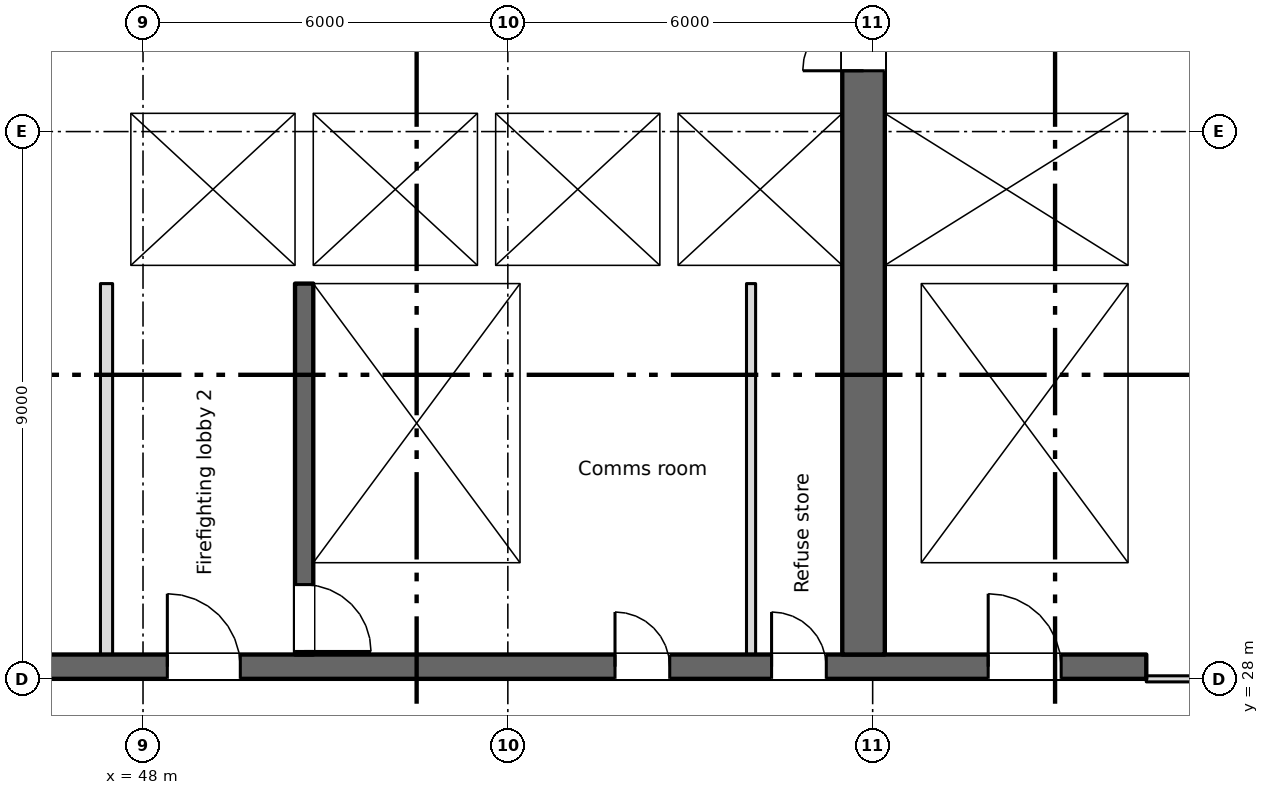
"""IFC4 building model, lengths in metres.
Left out: names, types, materials, properties, quantities, classifications, styles, units other than length and angle.
Written with IfcOpenShell. Run it as: python <this file> out.ifc"""

import sys

from ifc_helpers import new_model, si_unit, direction, frame, frame_2d, origin, place, context, subcontext, project, spatial, rectangle, extrude, element, fill, save


model = new_model("IFC4")
c1 = context("Model", 3, precision=1e-05, world=origin(), true_north=direction((0.0, 1.0)))
c2 = subcontext(c1, "Body", "Model", "MODEL_VIEW")
j1 = project(units=[si_unit("LENGTHUNIT", "METRE"), si_unit("PLANEANGLEUNIT", "RADIAN")], contexts=[c1])
p1 = place(None, origin())
s1 = spatial("IfcSite", under=j1, at=p1, CompositionType="ELEMENT")
p2 = place(p1, origin())
s2 = spatial("IfcBuilding", under=s1, at=p2, CompositionType="ELEMENT")
p3 = place(p2, frame((0.0, 0.0, 215.5)))
s3 = spatial("IfcBuildingStorey", under=s2, at=p3, CompositionType="ELEMENT", Elevation=215.5)
p4 = place(p3, frame((6.6, 28.2, 0.0), z_axis=(0.0, 0.0, 1.0), x_axis=(1.0, 0.0, 0.0)))
e1 = element("IfcWall", 1, at=p4, inside=s3, PredefinedType="SHEAR", context=c2, shape_type="SweptSolid", body=[
    extrude(rectangle(XDim=57.9, YDim=0.4, at=frame_2d((28.95, 0.0))), origin(), (0.0, 0.0, 1.0), 3.35),
])
p5 = place(p4, frame((12.163, 0.0, 0.0)))
e2 = element("IfcOpeningElement", 2, at=p5, cuts=e1, PredefinedType="OPENING", context=c2, shape_type="SweptSolid", body=[
    extrude(rectangle(XDim=0.9, YDim=2.1, at=frame_2d((0.45, 1.05))), frame((0.0, 0.21, 0.0), z_axis=(0.0, -1.0, 0.0), x_axis=(1.0, 0.0, 0.0)), (0.0, 0.0, 1.0), 0.42),
])
p6 = place(p4, frame((14.738, 0.0, 0.0)))
e3 = element("IfcOpeningElement", 3, at=p6, cuts=e1, PredefinedType="OPENING", context=c2, shape_type="SweptSolid", body=[
    extrude(rectangle(XDim=0.9, YDim=2.1, at=frame_2d((0.45, 1.05))), frame((0.0, 0.21, 0.0), z_axis=(0.0, -1.0, 0.0), x_axis=(1.0, 0.0, 0.0)), (0.0, 0.0, 1.0), 0.42),
])
p7 = place(p4, frame((49.163, 0.0, 0.0)))
e4 = element("IfcOpeningElement", 4, at=p7, cuts=e1, PredefinedType="OPENING", context=c2, shape_type="SweptSolid", body=[
    extrude(rectangle(XDim=0.9, YDim=2.1, at=frame_2d((0.45, 1.05))), frame((0.0, 0.21, 0.0), z_axis=(0.0, -1.0, 0.0), x_axis=(1.0, 0.0, 0.0)), (0.0, 0.0, 1.0), 0.42),
])
p8 = place(p4, frame((51.738, 0.0, 0.0)))
e5 = element("IfcOpeningElement", 5, at=p8, cuts=e1, PredefinedType="OPENING", context=c2, shape_type="SweptSolid", body=[
    extrude(rectangle(XDim=0.9, YDim=2.1, at=frame_2d((0.45, 1.05))), frame((0.0, 0.21, 0.0), z_axis=(0.0, -1.0, 0.0), x_axis=(1.0, 0.0, 0.0)), (0.0, 0.0, 1.0), 0.42),
])
p9 = place(p4, frame((1.45, 0.0, 0.0)))
e6 = element("IfcOpeningElement", 6, at=p9, cuts=e1, PredefinedType="OPENING", context=c2, shape_type="SweptSolid", body=[
    extrude(rectangle(XDim=0.9, YDim=2.1, at=frame_2d((0.45, 1.05))), frame((0.0, 0.21, 0.0), z_axis=(0.0, -1.0, 0.0), x_axis=(1.0, 0.0, 0.0)), (0.0, 0.0, 1.0), 0.42),
])
p10 = place(p4, frame((4.8, 0.0, 0.0)))
e7 = element("IfcOpeningElement", 7, at=p10, cuts=e1, PredefinedType="OPENING", context=c2, shape_type="SweptSolid", body=[
    extrude(rectangle(XDim=1.2, YDim=2.1, at=frame_2d((0.6, 1.05))), frame((0.0, 0.21, 0.0), z_axis=(0.0, -1.0, 0.0), x_axis=(1.0, 0.0, 0.0)), (0.0, 0.0, 1.0), 0.42),
])
p11 = place(p4, frame((31.8, 0.0, 0.0)))
e8 = element("IfcOpeningElement", 8, at=p11, cuts=e1, PredefinedType="OPENING", context=c2, shape_type="SweptSolid", body=[
    extrude(rectangle(XDim=1.2, YDim=2.1, at=frame_2d((0.6, 1.05))), frame((0.0, 0.21, 0.0), z_axis=(0.0, -1.0, 0.0), x_axis=(1.0, 0.0, 0.0)), (0.0, 0.0, 1.0), 0.42),
])
p12 = place(p4, frame((55.3, 0.0, 0.0)))
e9 = element("IfcOpeningElement", 9, at=p12, cuts=e1, PredefinedType="OPENING", context=c2, shape_type="SweptSolid", body=[
    extrude(rectangle(XDim=1.2, YDim=2.1, at=frame_2d((0.6, 1.05))), frame((0.0, 0.21, 0.0), z_axis=(0.0, -1.0, 0.0), x_axis=(1.0, 0.0, 0.0)), (0.0, 0.0, 1.0), 0.42),
])
p13 = place(p4, frame((21.8, 0.0, 0.0)))
e10 = element("IfcOpeningElement", 10, at=p13, cuts=e1, PredefinedType="OPENING", context=c2, shape_type="SweptSolid", body=[
    extrude(rectangle(XDim=1.2, YDim=2.1, at=frame_2d((0.6, 1.05))), frame((0.0, 0.21, 0.0), z_axis=(0.0, -1.0, 0.0), x_axis=(1.0, 0.0, 0.0)), (0.0, 0.0, 1.0), 0.42),
])
p14 = place(p4, frame((41.8, 0.0, 0.0)))
e11 = element("IfcOpeningElement", 11, at=p14, cuts=e1, PredefinedType="OPENING", context=c2, shape_type="SweptSolid", body=[
    extrude(rectangle(XDim=1.2, YDim=2.1, at=frame_2d((0.6, 1.05))), frame((0.0, 0.21, 0.0), z_axis=(0.0, -1.0, 0.0), x_axis=(1.0, 0.0, 0.0)), (0.0, 0.0, 1.0), 0.42),
])
p15 = place(p4, frame((24.95, 0.0, 0.0)))
e12 = element("IfcOpeningElement", 12, at=p15, cuts=e1, PredefinedType="OPENING", context=c2, shape_type="SweptSolid", body=[
    extrude(rectangle(XDim=2.4, YDim=2.1, at=frame_2d((1.2, 1.05))), frame((0.0, 0.21, 0.0), z_axis=(0.0, -1.0, 0.0), x_axis=(1.0, 0.0, 0.0)), (0.0, 0.0, 1.0), 0.42),
])
p16 = place(p4, frame((37.45, 0.0, 0.0)))
e13 = element("IfcOpeningElement", 13, at=p16, cuts=e1, PredefinedType="OPENING", context=c2, shape_type="SweptSolid", body=[
    extrude(rectangle(XDim=2.4, YDim=2.1, at=frame_2d((1.2, 1.05))), frame((0.0, 0.21, 0.0), z_axis=(0.0, -1.0, 0.0), x_axis=(1.0, 0.0, 0.0)), (0.0, 0.0, 1.0), 0.42),
])
p17 = place(p4, frame((8.1, 0.0, 0.0)))
e14 = element("IfcOpeningElement", 14, at=p17, cuts=e1, PredefinedType="OPENING", context=c2, shape_type="SweptSolid", body=[
    extrude(rectangle(XDim=2.4, YDim=2.1, at=frame_2d((1.2, 1.05))), frame((0.0, 0.21, 0.0), z_axis=(0.0, -1.0, 0.0), x_axis=(1.0, 0.0, 0.0)), (0.0, 0.0, 1.0), 0.42),
])
p18 = place(p4, frame((28.95, 0.0, 0.0)))
e15 = element("IfcOpeningElement", 15, at=p18, cuts=e1, PredefinedType="OPENING", context=c2, shape_type="SweptSolid", body=[
    extrude(rectangle(XDim=0.9, YDim=2.1, at=frame_2d((0.45, 1.05))), frame((0.0, 0.21, 0.0), z_axis=(0.0, -1.0, 0.0), x_axis=(1.0, 0.0, 0.0)), (0.0, 0.0, 1.0), 0.42),
])
p19 = place(p4, frame((34.95, 0.0, 0.0)))
e16 = element("IfcOpeningElement", 16, at=p19, cuts=e1, PredefinedType="OPENING", context=c2, shape_type="SweptSolid", body=[
    extrude(rectangle(XDim=0.9, YDim=2.1, at=frame_2d((0.45, 1.05))), frame((0.0, 0.21, 0.0), z_axis=(0.0, -1.0, 0.0), x_axis=(1.0, 0.0, 0.0)), (0.0, 0.0, 1.0), 0.42),
])
p20 = place(p3, frame((64.35, 34.8, 0.0), z_axis=(0.0, 0.0, 1.0), x_axis=(0.0, 1.0, 0.0)))
e17 = element("IfcWall", 17, at=p20, inside=s3, PredefinedType="SHEAR", context=c2, shape_type="SweptSolid", body=[
    extrude(rectangle(XDim=10.5, YDim=0.3, at=frame_2d((5.25, 0.0))), origin(), (0.0, 0.0, 1.0), 3.35),
])
p21 = place(p3, frame((59.85, 28.4, 0.0), z_axis=(0.0, 0.0, 1.0), x_axis=(0.0, 1.0, 0.0)))
e18 = element("IfcWall", 18, at=p21, inside=s3, PredefinedType="SHEAR", context=c2, shape_type="SweptSolid", body=[
    extrude(rectangle(XDim=16.9, YDim=0.7, at=frame_2d((8.45, 0.0))), origin(), (0.0, 0.0, 1.0), 3.35),
])
p22 = place(p21, frame((9.6, 0.0, 0.0)))
e19 = element("IfcOpeningElement", 19, at=p22, cuts=e18, PredefinedType="OPENING", context=c2, shape_type="SweptSolid", body=[
    extrude(rectangle(XDim=2.0, YDim=2.1, at=frame_2d((1.0, 1.05))), frame((0.0, 0.36, 0.0), z_axis=(0.0, -1.0, 0.0), x_axis=(1.0, 0.0, 0.0)), (0.0, 0.0, 1.0), 0.72),
])
p23 = place(p21, frame((15.4, 0.0, 0.0)))
e20 = element("IfcOpeningElement", 20, at=p23, cuts=e18, PredefinedType="OPENING", context=c2, shape_type="SweptSolid", body=[
    extrude(rectangle(XDim=1.2, YDim=2.1, at=frame_2d((0.6, 1.05))), frame((0.0, 0.36, 0.0), z_axis=(0.0, -1.0, 0.0), x_axis=(1.0, 0.0, 0.0)), (0.0, 0.0, 1.0), 0.72),
])
p24 = place(p3, frame((50.65, 34.5, 0.0), z_axis=(0.0, 0.0, 1.0), x_axis=(0.0, -1.0, 0.0)))
e21 = element("IfcWall", 21, at=p24, inside=s3, PredefinedType="SHEAR", context=c2, shape_type="SweptSolid", body=[
    extrude(rectangle(XDim=6.1, YDim=0.3, at=frame_2d((3.05, 0.0))), origin(), (0.0, 0.0, 1.0), 3.35),
])
p25 = place(p24, frame((4.95, 0.0, 0.0)))
e22 = element("IfcOpeningElement", 22, at=p25, cuts=e21, PredefinedType="OPENING", context=c2, shape_type="SweptSolid", body=[
    extrude(rectangle(XDim=1.1, YDim=2.1, at=frame_2d((0.55, 1.05))), frame((0.0, 0.16, 0.0), z_axis=(0.0, -1.0, 0.0), x_axis=(1.0, 0.0, 0.0)), (0.0, 0.0, 1.0), 0.32),
])
p26 = place(p3, frame((54.35, 28.4, 0.0), z_axis=(0.0, 0.0, 1.0), x_axis=(0.0, 1.0, 0.0)))
e23 = element("IfcWall", 23, at=p26, inside=s3, PredefinedType="SHEAR", context=c2, shape_type="SweptSolid", body=[
    extrude(rectangle(XDim=6.1, YDim=0.3, at=frame_2d((3.05, 0.0))), origin(), (0.0, 0.0, 1.0), 3.35),
])
p27 = place(p3, frame((60.5, 28.4, 0.0), z_axis=(0.0, 0.0, 1.0), x_axis=(0.0, 1.0, 0.0)))
e24 = element("IfcWall", 24, at=p27, inside=s3, PredefinedType="SHEAR", context=c2, shape_type="SweptSolid", body=[
    extrude(rectangle(XDim=6.1, YDim=0.6, at=frame_2d((3.05, 0.0))), origin(), (0.0, 0.0, 1.0), 3.35),
])
p28 = place(p3, frame((64.35, 28.4, 0.0), z_axis=(0.0, 0.0, 1.0), x_axis=(0.0, 1.0, 0.0)))
e25 = element("IfcWall", 25, at=p28, inside=s3, PredefinedType="SHEAR", context=c2, shape_type="SweptSolid", body=[
    extrude(rectangle(XDim=6.1, YDim=0.3, at=frame_2d((3.05, 0.0))), origin(), (0.0, 0.0, 1.0), 3.35),
])
p29 = place(p3, frame((47.3, 34.65, 0.0), z_axis=(0.0, 0.0, 1.0), x_axis=(1.0, 0.0, 0.0)))
e26 = element("IfcWall", 26, at=p29, inside=s3, PredefinedType="SHEAR", context=c2, shape_type="SweptSolid", body=[
    extrude(rectangle(XDim=12.2, YDim=0.3, at=frame_2d((6.1, 0.0))), origin(), (0.0, 0.0, 1.0), 3.35),
])
p30 = place(p29, frame((1.3, 0.0, 0.0)))
e27 = element("IfcOpeningElement", 27, at=p30, cuts=e26, PredefinedType="OPENING", context=c2, shape_type="SweptSolid", body=[
    extrude(rectangle(XDim=1.1, YDim=2.1, at=frame_2d((0.55, 1.05))), frame((0.0, 0.16, 0.0), z_axis=(0.0, -1.0, 0.0), x_axis=(1.0, 0.0, 0.0)), (0.0, 0.0, 1.0), 0.32),
])
p31 = place(p3, frame((60.2, 34.65, 0.0), z_axis=(0.0, 0.0, 1.0), x_axis=(1.0, 0.0, 0.0)))
e28 = element("IfcWall", 28, at=p31, inside=s3, PredefinedType="SHEAR", context=c2, shape_type="SweptSolid", body=[
    extrude(rectangle(XDim=4.3, YDim=0.3, at=frame_2d((2.15, 0.0))), origin(), (0.0, 0.0, 1.0), 3.35),
])
p32 = place(p3, frame((47.3, 37.45, 0.0), z_axis=(0.0, 0.0, 1.0), x_axis=(1.0, 0.0, 0.0)))
e29 = element("IfcWall", 29, at=p32, inside=s3, PredefinedType="SHEAR", context=c2, shape_type="SweptSolid", body=[
    extrude(rectangle(XDim=12.2, YDim=0.3, at=frame_2d((6.1, 0.0))), origin(), (0.0, 0.0, 1.0), 3.35),
])
p33 = place(p32, frame((4.3, 0.0, 0.0)))
e30 = element("IfcOpeningElement", 30, at=p33, cuts=e29, PredefinedType="OPENING", context=c2, shape_type="SweptSolid", body=[
    extrude(rectangle(XDim=1.1, YDim=2.1, at=frame_2d((0.55, 1.05))), frame((0.0, 0.16, 0.0), z_axis=(0.0, -1.0, 0.0), x_axis=(1.0, 0.0, 0.0)), (0.0, 0.0, 1.0), 0.32),
])
p34 = place(p32, frame((7.3, 0.0, 0.0)))
e31 = element("IfcOpeningElement", 31, at=p34, cuts=e29, PredefinedType="OPENING", context=c2, shape_type="SweptSolid", body=[
    extrude(rectangle(XDim=1.1, YDim=2.1, at=frame_2d((0.55, 1.05))), frame((0.0, 0.16, 0.0), z_axis=(0.0, -1.0, 0.0), x_axis=(1.0, 0.0, 0.0)), (0.0, 0.0, 1.0), 0.32),
])
p35 = place(p32, frame((10.3, 0.0, 0.0)))
e32 = element("IfcOpeningElement", 32, at=p35, cuts=e29, PredefinedType="OPENING", context=c2, shape_type="SweptSolid", body=[
    extrude(rectangle(XDim=1.1, YDim=2.1, at=frame_2d((0.55, 1.05))), frame((0.0, 0.16, 0.0), z_axis=(0.0, -1.0, 0.0), x_axis=(1.0, 0.0, 0.0)), (0.0, 0.0, 1.0), 0.32),
])
p36 = place(p3, frame((60.2, 37.45, 0.0), z_axis=(0.0, 0.0, 1.0), x_axis=(1.0, 0.0, 0.0)))
e33 = element("IfcWall", 33, at=p36, inside=s3, PredefinedType="SHEAR", context=c2, shape_type="SweptSolid", body=[
    extrude(rectangle(XDim=4.0, YDim=0.3, at=frame_2d((2.0, 0.0))), origin(), (0.0, 0.0, 1.0), 3.35),
])
p37 = place(p36, frame((1.45, 0.0, 0.0)))
e34 = element("IfcOpeningElement", 34, at=p37, cuts=e33, PredefinedType="OPENING", context=c2, shape_type="SweptSolid", body=[
    extrude(rectangle(XDim=1.1, YDim=2.1, at=frame_2d((0.55, 1.05))), frame((0.0, 0.16, 0.0), z_axis=(0.0, -1.0, 0.0), x_axis=(1.0, 0.0, 0.0)), (0.0, 0.0, 1.0), 0.32),
])
p38 = place(p3, frame((47.55, 34.8, 0.0), z_axis=(0.0, 0.0, 1.0), x_axis=(0.0, 1.0, 0.0)))
e35 = element("IfcWall", 35, at=p38, inside=s3, PredefinedType="SHEAR", context=c2, shape_type="SweptSolid", body=[
    extrude(rectangle(XDim=2.5, YDim=0.5, at=frame_2d((1.25, 0.0))), origin(), (0.0, 0.0, 1.0), 3.35),
])
for number, where, z_axis, x_axis in (
    (36, (50.65, 34.8, 0.0), (0.0, 0.0, 1.0), (0.0, 1.0, 0.0)),
    (37, (53.65, 34.8, 0.0), (0.0, 0.0, 1.0), (0.0, 1.0, 0.0)),
    (38, (56.65, 34.8, 0.0), (0.0, 0.0, 1.0), (0.0, 1.0, 0.0)),
):
    element("IfcWall", number, at=place(p3, frame(where, z_axis=z_axis, x_axis=x_axis)), inside=s3, PredefinedType="SHEAR", context=c2, shape_type="SweptSolid", body=[
        extrude(rectangle(XDim=2.5, YDim=0.3, at=frame_2d((1.25, 0.0))), origin(), (0.0, 0.0, 1.0), 3.35),
    ])
p39 = place(p3, frame((47.4, 28.4, 0.0), z_axis=(0.0, 0.0, 1.0), x_axis=(0.0, 1.0, 0.0)))
e39 = element("IfcWall", 39, at=p39, inside=s3, PredefinedType="PARTITIONING", context=c2, shape_type="SweptSolid", body=[
    extrude(rectangle(XDim=6.1, YDim=0.2, at=frame_2d((3.05, 0.0))), origin(), (0.0, 0.0, 1.0), 3.35),
])
p40 = place(p3, frame((58.0, 28.4, 0.0), z_axis=(0.0, 0.0, 1.0), x_axis=(0.0, 1.0, 0.0)))
e40 = element("IfcWall", 40, at=p40, inside=s3, PredefinedType="PARTITIONING", context=c2, shape_type="SweptSolid", body=[
    extrude(rectangle(XDim=6.1, YDim=0.15, at=frame_2d((3.05, 0.0))), origin(), (0.0, 0.0, 1.0), 3.35),
])
p41 = place(p3, frame((64.5, 28.0, 0.0), z_axis=(0.0, 0.0, 1.0), x_axis=(1.0, 0.0, 0.0)))
e41 = element("IfcWall", 41, at=p41, inside=s3, PredefinedType="PARTITIONING", context=c2, shape_type="SweptSolid", body=[
    extrude(rectangle(XDim=6.9, YDim=0.1, at=frame_2d((3.45, 0.0))), origin(), (0.0, 0.0, 1.0), 3.35),
])
p42 = place(p41, frame((2.55, 0.0, 0.0)))
e42 = element("IfcOpeningElement", 42, at=p42, cuts=e41, PredefinedType="OPENING", context=c2, shape_type="SweptSolid", body=[
    extrude(rectangle(XDim=1.8, YDim=2.1, at=frame_2d((0.9, 1.05))), frame((0.0, 0.06, 0.0), z_axis=(0.0, -1.0, 0.0), x_axis=(1.0, 0.0, 0.0)), (0.0, 0.0, 1.0), 0.12),
])
p43 = place(p7, origin())
e43 = element("IfcDoor", 43, at=p43, inside=s3, OperationType="SINGLE_SWING_LEFT", PredefinedType="DOOR", context=c2, shape_type="SweptSolid", body=[
    extrude(rectangle(XDim=0.9, YDim=2.1, at=frame_2d((0.45, 1.05))), frame((0.0, 0.025, 0.0), z_axis=(0.0, -1.0, 0.0), x_axis=(1.0, 0.0, 0.0)), (0.0, 0.0, 1.0), 0.05),
])
fill(e4, e43)
p44 = place(p8, origin())
e44 = element("IfcDoor", 44, at=p44, inside=s3, OperationType="SINGLE_SWING_LEFT", PredefinedType="DOOR", context=c2, shape_type="SweptSolid", body=[
    extrude(rectangle(XDim=0.9, YDim=2.1, at=frame_2d((0.45, 1.05))), frame((0.0, 0.025, 0.0), z_axis=(0.0, -1.0, 0.0), x_axis=(1.0, 0.0, 0.0)), (0.0, 0.0, 1.0), 0.05),
])
fill(e5, e44)
p45 = place(p33, origin())
e45 = element("IfcDoor", 45, at=p45, inside=s3, OperationType="SLIDING_TO_LEFT", PredefinedType="DOOR", context=c2, shape_type="SweptSolid", body=[
    extrude(rectangle(XDim=1.1, YDim=2.1, at=frame_2d((0.55, 1.05))), frame((0.0, 0.025, 0.0), z_axis=(0.0, -1.0, 0.0), x_axis=(1.0, 0.0, 0.0)), (0.0, 0.0, 1.0), 0.05),
])
fill(e30, e45)
p46 = place(p34, origin())
e46 = element("IfcDoor", 46, at=p46, inside=s3, OperationType="SLIDING_TO_LEFT", PredefinedType="DOOR", context=c2, shape_type="SweptSolid", body=[
    extrude(rectangle(XDim=1.1, YDim=2.1, at=frame_2d((0.55, 1.05))), frame((0.0, 0.025, 0.0), z_axis=(0.0, -1.0, 0.0), x_axis=(1.0, 0.0, 0.0)), (0.0, 0.0, 1.0), 0.05),
])
fill(e31, e46)
p47 = place(p35, origin())
e47 = element("IfcDoor", 47, at=p47, inside=s3, OperationType="SLIDING_TO_LEFT", PredefinedType="DOOR", context=c2, shape_type="SweptSolid", body=[
    extrude(rectangle(XDim=1.1, YDim=2.1, at=frame_2d((0.55, 1.05))), frame((0.0, 0.025, 0.0), z_axis=(0.0, -1.0, 0.0), x_axis=(1.0, 0.0, 0.0)), (0.0, 0.0, 1.0), 0.05),
])
fill(e32, e47)
p48 = place(p37, origin())
e48 = element("IfcDoor", 48, at=p48, inside=s3, OperationType="SLIDING_TO_LEFT", PredefinedType="DOOR", context=c2, shape_type="SweptSolid", body=[
    extrude(rectangle(XDim=1.1, YDim=2.1, at=frame_2d((0.55, 1.05))), frame((0.0, 0.025, 0.0), z_axis=(0.0, -1.0, 0.0), x_axis=(1.0, 0.0, 0.0)), (0.0, 0.0, 1.0), 0.05),
])
fill(e34, e48)
p49 = place(p30, origin())
e49 = element("IfcDoor", 49, at=p49, inside=s3, OperationType="SLIDING_TO_LEFT", PredefinedType="DOOR", context=c2, shape_type="SweptSolid", body=[
    extrude(rectangle(XDim=1.1, YDim=2.1, at=frame_2d((0.55, 1.05))), frame((0.0, 0.025, 0.0), z_axis=(0.0, -1.0, 0.0), x_axis=(1.0, 0.0, 0.0)), (0.0, 0.0, 1.0), 0.05),
])
fill(e27, e49)
p50 = place(p25, origin())
e50 = element("IfcDoor", 50, at=p50, inside=s3, OperationType="SINGLE_SWING_RIGHT", PredefinedType="DOOR", context=c2, shape_type="SweptSolid", body=[
    extrude(rectangle(XDim=1.1, YDim=2.1, at=frame_2d((0.55, 1.05))), frame((0.0, 0.025, 0.0), z_axis=(0.0, -1.0, 0.0), x_axis=(1.0, 0.0, 0.0)), (0.0, 0.0, 1.0), 0.05),
])
fill(e22, e50)
p51 = place(p12, origin())
e51 = element("IfcDoor", 51, at=p51, inside=s3, OperationType="SINGLE_SWING_LEFT", PredefinedType="DOOR", context=c2, shape_type="SweptSolid", body=[
    extrude(rectangle(XDim=1.2, YDim=2.1, at=frame_2d((0.6, 1.05))), frame((0.0, 0.025, 0.0), z_axis=(0.0, -1.0, 0.0), x_axis=(1.0, 0.0, 0.0)), (0.0, 0.0, 1.0), 0.05),
])
fill(e9, e51)
p52 = place(p14, origin())
e52 = element("IfcDoor", 52, at=p52, inside=s3, OperationType="SINGLE_SWING_LEFT", PredefinedType="DOOR", context=c2, shape_type="SweptSolid", body=[
    extrude(rectangle(XDim=1.2, YDim=2.1, at=frame_2d((0.6, 1.05))), frame((0.0, 0.025, 0.0), z_axis=(0.0, -1.0, 0.0), x_axis=(1.0, 0.0, 0.0)), (0.0, 0.0, 1.0), 0.05),
])
fill(e11, e52)
p53 = place(p22, origin())
e53 = element("IfcDoor", 53, at=p53, inside=s3, OperationType="DOUBLE_DOOR_SINGLE_SWING", PredefinedType="DOOR", context=c2, shape_type="SweptSolid", body=[
    extrude(rectangle(XDim=2.0, YDim=2.1, at=frame_2d((1.0, 1.05))), frame((0.0, 0.025, 0.0), z_axis=(0.0, -1.0, 0.0), x_axis=(1.0, 0.0, 0.0)), (0.0, 0.0, 1.0), 0.05),
])
fill(e19, e53)
save(model, sys.argv[1])
